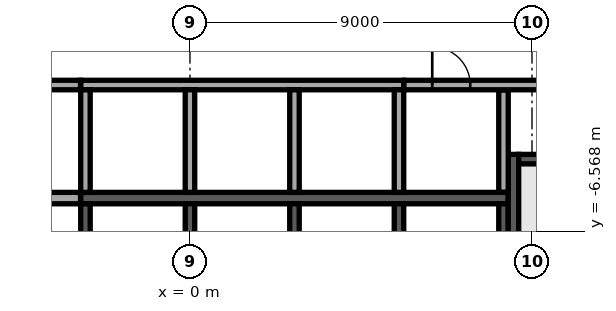
"""IFC4 building model, lengths in metres.
Left out: names, types, materials, properties, quantities, classifications, styles, units other than length and angle.
Written with IfcOpenShell. Run it as: python <this file> out.ifc"""

import sys

from ifc_helpers import new_model, si_unit, direction, frame, frame_2d, origin, place, context, subcontext, project, spatial, rectangle, extrude, element, fill, save


model = new_model("IFC4")
c1 = context("Model", 3, precision=1e-05, world=origin(), true_north=direction((0.0, 1.0)))
c2 = subcontext(c1, "Body", "Model", "MODEL_VIEW")
j1 = project(units=[si_unit("LENGTHUNIT", "METRE"), si_unit("PLANEANGLEUNIT", "RADIAN")], contexts=[c1])
p1 = place(None, origin())
s1 = spatial("IfcSite", under=j1, at=p1, CompositionType="ELEMENT")
p2 = place(p1, origin())
s2 = spatial("IfcBuilding", under=s1, at=p2, CompositionType="ELEMENT")
p3 = place(p2, frame((0.0, 0.0, 225.3)))
s3 = spatial("IfcBuildingStorey", under=s2, at=p3, CompositionType="ELEMENT", Elevation=225.3)
p4 = place(p3, frame((-2.875, -5.7, 0.0), z_axis=(0.0, 0.0, 1.0), x_axis=(1.0, 0.0, 0.0)))
e1 = element("IfcWall", 1, at=p4, inside=s3, PredefinedType="SOLIDWALL", context=c2, shape_type="SweptSolid", body=[
    extrude(rectangle(XDim=11.25, YDim=0.3, at=frame_2d((5.625, 0.0))), origin(), (0.0, 0.0, 1.0), 3.62),
])
p5 = place(p3, frame((-2.875, -2.725, 0.0), z_axis=(0.0, 0.0, 1.0), x_axis=(1.0, 0.0, 0.0)))
e2 = element("IfcWall", 2, at=p5, inside=s3, PredefinedType="SOLIDWALL", context=c2, shape_type="SweptSolid", body=[
    extrude(rectangle(XDim=8.5, YDim=0.25, at=frame_2d((4.25, 0.0))), origin(), (0.0, 0.0, 1.0), 3.62),
])
for number, where, z_axis, x_axis in (
    (3, (-2.75, -5.55, 0.0), (0.0, 0.0, 1.0), (0.0, 1.0, 0.0)),
    (4, (0.0, -5.55, 0.0), (0.0, 0.0, 1.0), (0.0, 1.0, 0.0)),
    (5, (2.75, -5.55, 0.0), (0.0, 0.0, 1.0), (0.0, 1.0, 0.0)),
    (6, (5.5, -5.55, 0.0), (0.0, 0.0, 1.0), (0.0, 1.0, 0.0)),
    (7, (-2.75, -8.55, 0.0), (0.0, 0.0, 1.0), (0.0, 1.0, 0.0)),
    (8, (0.0, -8.55, 0.0), (0.0, 0.0, 1.0), (0.0, 1.0, 0.0)),
    (9, (2.75, -8.55, 0.0), (0.0, 0.0, 1.0), (0.0, 1.0, 0.0)),
    (10, (5.5, -8.55, 0.0), (0.0, 0.0, 1.0), (0.0, 1.0, 0.0)),
    (11, (8.25, -8.55, 0.0), (0.0, 0.0, 1.0), (0.0, 1.0, 0.0)),
):
    element("IfcWall", number, at=place(p3, frame(where, z_axis=z_axis, x_axis=x_axis)), inside=s3, PredefinedType="SOLIDWALL", context=c2, shape_type="SweptSolid", body=[
        extrude(rectangle(XDim=2.7, YDim=0.25, at=frame_2d((1.35, 0.0))), origin(), (0.0, 0.0, 1.0), 3.62),
    ])
p6 = place(p3, frame((8.512, -4.55, 0.0), z_axis=(0.0, 0.0, 1.0), x_axis=(0.0, -1.0, 0.0)))
e12 = element("IfcWall", 12, at=p6, inside=s3, PredefinedType="SOLIDWALL", context=c2, shape_type="SweptSolid", body=[
    extrude(rectangle(XDim=7.25, YDim=0.275, at=frame_2d((3.625, 0.0))), origin(), (0.0, 0.0, 1.0), 3.62),
])
p7 = place(p6, frame((6.0, 0.0, 0.0)))
e13 = element("IfcOpeningElement", 13, at=p7, cuts=e12, PredefinedType="OPENING", context=c2, shape_type="SweptSolid", body=[
    extrude(rectangle(XDim=1.0, YDim=2.1, at=frame_2d((0.5, 1.05))), frame((0.0, 0.147, 0.0), z_axis=(0.0, -1.0, 0.0), x_axis=(1.0, 0.0, 0.0)), (0.0, 0.0, 1.0), 0.295),
])
p8 = place(p3, frame((8.65, -4.675, 0.0), z_axis=(0.0, 0.0, 1.0), x_axis=(1.0, 0.0, 0.0)))
e14 = element("IfcWall", 14, at=p8, inside=s3, PredefinedType="SOLIDWALL", context=c2, shape_type="SweptSolid", body=[
    extrude(rectangle(XDim=3.15, YDim=0.25, at=frame_2d((1.575, 0.0))), origin(), (0.0, 0.0, 1.0), 3.62),
])
p9 = place(p3, frame((-8.35, -5.7, 0.0), z_axis=(0.0, 0.0, 1.0), x_axis=(1.0, 0.0, 0.0)))
e15 = element("IfcWall", 15, at=p9, inside=s3, PredefinedType="PARTITIONING", context=c2, shape_type="SweptSolid", body=[
    extrude(rectangle(XDim=5.47, YDim=0.3, at=frame_2d((2.735, 0.0))), origin(), (0.0, 0.0, 1.0), 3.62),
])
p10 = place(p3, frame((8.25, -5.545, 0.0), z_axis=(0.0, 0.0, 1.0), x_axis=(0.0, 1.0, 0.0)))
e16 = element("IfcWall", 16, at=p10, inside=s3, PredefinedType="PARTITIONING", context=c2, shape_type="SweptSolid", body=[
    extrude(rectangle(XDim=2.69, YDim=0.25, at=frame_2d((1.345, 0.0))), origin(), (0.0, 0.0, 1.0), 3.62),
])
p11 = place(p3, frame((-11.795, -2.725, 0.0), z_axis=(0.0, 0.0, 1.0), x_axis=(1.0, 0.0, 0.0)))
e17 = element("IfcWall", 17, at=p11, inside=s3, PredefinedType="PARTITIONING", context=c2, shape_type="SweptSolid", body=[
    extrude(rectangle(XDim=8.915, YDim=0.25, at=frame_2d((4.458, 0.0))), origin(), (0.0, 0.0, 1.0), 3.62),
])
p12 = place(p11, frame((1.295, 0.0, 0.0)))
e18 = element("IfcOpeningElement", 18, at=p12, cuts=e17, PredefinedType="OPENING", context=c2, shape_type="SweptSolid", body=[
    extrude(rectangle(XDim=1.0, YDim=2.1, at=frame_2d((0.5, 1.05))), frame((0.0, 0.135, 0.0), z_axis=(0.0, -1.0, 0.0), x_axis=(1.0, 0.0, 0.0)), (0.0, 0.0, 1.0), 0.27),
])
p13 = place(p11, frame((4.42, 0.0, 0.0)))
e19 = element("IfcOpeningElement", 19, at=p13, cuts=e17, PredefinedType="OPENING", context=c2, shape_type="SweptSolid", body=[
    extrude(rectangle(XDim=1.0, YDim=2.1, at=frame_2d((0.5, 1.05))), frame((0.0, 0.135, 0.0), z_axis=(0.0, -1.0, 0.0), x_axis=(1.0, 0.0, 0.0)), (0.0, 0.0, 1.0), 0.27),
])
p14 = place(p3, frame((5.63, -2.725, 0.0), z_axis=(0.0, 0.0, 1.0), x_axis=(1.0, 0.0, 0.0)))
e20 = element("IfcWall", 20, at=p14, inside=s3, PredefinedType="PARTITIONING", context=c2, shape_type="SweptSolid", body=[
    extrude(rectangle(XDim=6.165, YDim=0.25, at=frame_2d((3.083, 0.0))), origin(), (0.0, 0.0, 1.0), 3.62),
])
p15 = place(p14, frame((0.745, 0.0, 0.0)))
e21 = element("IfcOpeningElement", 21, at=p15, cuts=e20, PredefinedType="OPENING", context=c2, shape_type="SweptSolid", body=[
    extrude(rectangle(XDim=1.0, YDim=2.1, at=frame_2d((0.5, 1.05))), frame((0.0, 0.135, 0.0), z_axis=(0.0, -1.0, 0.0), x_axis=(1.0, 0.0, 0.0)), (0.0, 0.0, 1.0), 0.27),
])
p16 = place(p14, frame((3.92, 0.0, 0.0)))
e22 = element("IfcOpeningElement", 22, at=p16, cuts=e20, PredefinedType="OPENING", context=c2, shape_type="SweptSolid", body=[
    extrude(rectangle(XDim=0.9, YDim=2.1, at=frame_2d((0.45, 1.05))), frame((0.0, 0.135, 0.0), z_axis=(0.0, -1.0, 0.0), x_axis=(1.0, 0.0, 0.0)), (0.0, 0.0, 1.0), 0.27),
])
p17 = place(p3, frame((-3.777, 34.584, 0.0), z_axis=(0.0, 0.0, 1.0), x_axis=(-0.629323778295, -0.777143218508, 0.0)))
e23 = element("IfcWall", 23, at=p17, inside=s3, PredefinedType="STANDARD", context=c2, shape_type="SweptSolid", body=[
    extrude(rectangle(XDim=49.0, YDim=0.6, at=frame_2d((24.5, 0.0))), origin(), (0.0, 0.0, 1.0), 3.62),
])
p18 = place(p17, frame((1.227, 0.0, 0.9)))
e24 = element("IfcOpeningElement", 24, at=p18, cuts=e23, PredefinedType="OPENING", context=c2, shape_type="SweptSolid", body=[
    extrude(rectangle(XDim=2.0, YDim=2.1, at=frame_2d((1.0, 1.05))), frame((0.0, 0.31, 0.0), z_axis=(0.0, -1.0, 0.0), x_axis=(1.0, 0.0, 0.0)), (0.0, 0.0, 1.0), 0.62),
])
p19 = place(p17, frame((5.682, 0.0, 0.9)))
e25 = element("IfcOpeningElement", 25, at=p19, cuts=e23, PredefinedType="OPENING", context=c2, shape_type="SweptSolid", body=[
    extrude(rectangle(XDim=2.0, YDim=2.1, at=frame_2d((1.0, 1.05))), frame((0.0, 0.31, 0.0), z_axis=(0.0, -1.0, 0.0), x_axis=(1.0, 0.0, 0.0)), (0.0, 0.0, 1.0), 0.62),
])
p20 = place(p17, frame((10.136, 0.0, 0.9)))
e26 = element("IfcOpeningElement", 26, at=p20, cuts=e23, PredefinedType="OPENING", context=c2, shape_type="SweptSolid", body=[
    extrude(rectangle(XDim=2.0, YDim=2.1, at=frame_2d((1.0, 1.05))), frame((0.0, 0.31, 0.0), z_axis=(0.0, -1.0, 0.0), x_axis=(1.0, 0.0, 0.0)), (0.0, 0.0, 1.0), 0.62),
])
p21 = place(p17, frame((14.591, 0.0, 0.9)))
e27 = element("IfcOpeningElement", 27, at=p21, cuts=e23, PredefinedType="OPENING", context=c2, shape_type="SweptSolid", body=[
    extrude(rectangle(XDim=2.0, YDim=2.1, at=frame_2d((1.0, 1.05))), frame((0.0, 0.31, 0.0), z_axis=(0.0, -1.0, 0.0), x_axis=(1.0, 0.0, 0.0)), (0.0, 0.0, 1.0), 0.62),
])
p22 = place(p17, frame((19.045, 0.0, 0.9)))
e28 = element("IfcOpeningElement", 28, at=p22, cuts=e23, PredefinedType="OPENING", context=c2, shape_type="SweptSolid", body=[
    extrude(rectangle(XDim=2.0, YDim=2.1, at=frame_2d((1.0, 1.05))), frame((0.0, 0.31, 0.0), z_axis=(0.0, -1.0, 0.0), x_axis=(1.0, 0.0, 0.0)), (0.0, 0.0, 1.0), 0.62),
])
p23 = place(p17, frame((23.5, 0.0, 0.9)))
e29 = element("IfcOpeningElement", 29, at=p23, cuts=e23, PredefinedType="OPENING", context=c2, shape_type="SweptSolid", body=[
    extrude(rectangle(XDim=2.0, YDim=2.1, at=frame_2d((1.0, 1.05))), frame((0.0, 0.31, 0.0), z_axis=(0.0, -1.0, 0.0), x_axis=(1.0, 0.0, 0.0)), (0.0, 0.0, 1.0), 0.62),
])
p24 = place(p17, frame((27.955, 0.0, 0.9)))
e30 = element("IfcOpeningElement", 30, at=p24, cuts=e23, PredefinedType="OPENING", context=c2, shape_type="SweptSolid", body=[
    extrude(rectangle(XDim=2.0, YDim=2.1, at=frame_2d((1.0, 1.05))), frame((0.0, 0.31, 0.0), z_axis=(0.0, -1.0, 0.0), x_axis=(1.0, 0.0, 0.0)), (0.0, 0.0, 1.0), 0.62),
])
p25 = place(p17, frame((32.409, 0.0, 0.9)))
e31 = element("IfcOpeningElement", 31, at=p25, cuts=e23, PredefinedType="OPENING", context=c2, shape_type="SweptSolid", body=[
    extrude(rectangle(XDim=2.0, YDim=2.1, at=frame_2d((1.0, 1.05))), frame((0.0, 0.31, 0.0), z_axis=(0.0, -1.0, 0.0), x_axis=(1.0, 0.0, 0.0)), (0.0, 0.0, 1.0), 0.62),
])
p26 = place(p17, frame((36.864, 0.0, 0.9)))
e32 = element("IfcOpeningElement", 32, at=p26, cuts=e23, PredefinedType="OPENING", context=c2, shape_type="SweptSolid", body=[
    extrude(rectangle(XDim=2.0, YDim=2.1, at=frame_2d((1.0, 1.05))), frame((0.0, 0.31, 0.0), z_axis=(0.0, -1.0, 0.0), x_axis=(1.0, 0.0, 0.0)), (0.0, 0.0, 1.0), 0.62),
])
p27 = place(p17, frame((41.318, 0.0, 0.9)))
e33 = element("IfcOpeningElement", 33, at=p27, cuts=e23, PredefinedType="OPENING", context=c2, shape_type="SweptSolid", body=[
    extrude(rectangle(XDim=2.0, YDim=2.1, at=frame_2d((1.0, 1.05))), frame((0.0, 0.31, 0.0), z_axis=(0.0, -1.0, 0.0), x_axis=(1.0, 0.0, 0.0)), (0.0, 0.0, 1.0), 0.62),
])
p28 = place(p17, frame((45.773, 0.0, 0.9)))
e34 = element("IfcOpeningElement", 34, at=p28, cuts=e23, PredefinedType="OPENING", context=c2, shape_type="SweptSolid", body=[
    extrude(rectangle(XDim=2.0, YDim=2.1, at=frame_2d((1.0, 1.05))), frame((0.0, 0.31, 0.0), z_axis=(0.0, -1.0, 0.0), x_axis=(1.0, 0.0, 0.0)), (0.0, 0.0, 1.0), 0.62),
])
p29 = place(p3, frame((3.777, -34.584, 0.0), z_axis=(0.0, 0.0, 1.0), x_axis=(0.629323778295, 0.777143218508, 0.0)))
e35 = element("IfcWall", 35, at=p29, inside=s3, PredefinedType="STANDARD", context=c2, shape_type="SweptSolid", body=[
    extrude(rectangle(XDim=49.0, YDim=0.6, at=frame_2d((24.5, 0.0))), origin(), (0.0, 0.0, 1.0), 3.62),
])
p30 = place(p29, frame((1.227, 0.0, 0.9)))
e36 = element("IfcOpeningElement", 36, at=p30, cuts=e35, PredefinedType="OPENING", context=c2, shape_type="SweptSolid", body=[
    extrude(rectangle(XDim=2.0, YDim=2.1, at=frame_2d((1.0, 1.05))), frame((0.0, 0.31, 0.0), z_axis=(0.0, -1.0, 0.0), x_axis=(1.0, 0.0, 0.0)), (0.0, 0.0, 1.0), 0.62),
])
p31 = place(p29, frame((5.682, 0.0, 0.9)))
e37 = element("IfcOpeningElement", 37, at=p31, cuts=e35, PredefinedType="OPENING", context=c2, shape_type="SweptSolid", body=[
    extrude(rectangle(XDim=2.0, YDim=2.1, at=frame_2d((1.0, 1.05))), frame((0.0, 0.31, 0.0), z_axis=(0.0, -1.0, 0.0), x_axis=(1.0, 0.0, 0.0)), (0.0, 0.0, 1.0), 0.62),
])
p32 = place(p29, frame((10.136, 0.0, 0.9)))
e38 = element("IfcOpeningElement", 38, at=p32, cuts=e35, PredefinedType="OPENING", context=c2, shape_type="SweptSolid", body=[
    extrude(rectangle(XDim=2.0, YDim=2.1, at=frame_2d((1.0, 1.05))), frame((0.0, 0.31, 0.0), z_axis=(0.0, -1.0, 0.0), x_axis=(1.0, 0.0, 0.0)), (0.0, 0.0, 1.0), 0.62),
])
p33 = place(p29, frame((14.591, 0.0, 0.9)))
e39 = element("IfcOpeningElement", 39, at=p33, cuts=e35, PredefinedType="OPENING", context=c2, shape_type="SweptSolid", body=[
    extrude(rectangle(XDim=2.0, YDim=2.1, at=frame_2d((1.0, 1.05))), frame((0.0, 0.31, 0.0), z_axis=(0.0, -1.0, 0.0), x_axis=(1.0, 0.0, 0.0)), (0.0, 0.0, 1.0), 0.62),
])
p34 = place(p29, frame((19.045, 0.0, 0.9)))
e40 = element("IfcOpeningElement", 40, at=p34, cuts=e35, PredefinedType="OPENING", context=c2, shape_type="SweptSolid", body=[
    extrude(rectangle(XDim=2.0, YDim=2.1, at=frame_2d((1.0, 1.05))), frame((0.0, 0.31, 0.0), z_axis=(0.0, -1.0, 0.0), x_axis=(1.0, 0.0, 0.0)), (0.0, 0.0, 1.0), 0.62),
])
p35 = place(p29, frame((23.5, 0.0, 0.9)))
e41 = element("IfcOpeningElement", 41, at=p35, cuts=e35, PredefinedType="OPENING", context=c2, shape_type="SweptSolid", body=[
    extrude(rectangle(XDim=2.0, YDim=2.1, at=frame_2d((1.0, 1.05))), frame((0.0, 0.31, 0.0), z_axis=(0.0, -1.0, 0.0), x_axis=(1.0, 0.0, 0.0)), (0.0, 0.0, 1.0), 0.62),
])
p36 = place(p29, frame((27.955, 0.0, 0.9)))
e42 = element("IfcOpeningElement", 42, at=p36, cuts=e35, PredefinedType="OPENING", context=c2, shape_type="SweptSolid", body=[
    extrude(rectangle(XDim=2.0, YDim=2.1, at=frame_2d((1.0, 1.05))), frame((0.0, 0.31, 0.0), z_axis=(0.0, -1.0, 0.0), x_axis=(1.0, 0.0, 0.0)), (0.0, 0.0, 1.0), 0.62),
])
p37 = place(p29, frame((32.409, 0.0, 0.9)))
e43 = element("IfcOpeningElement", 43, at=p37, cuts=e35, PredefinedType="OPENING", context=c2, shape_type="SweptSolid", body=[
    extrude(rectangle(XDim=2.0, YDim=2.1, at=frame_2d((1.0, 1.05))), frame((0.0, 0.31, 0.0), z_axis=(0.0, -1.0, 0.0), x_axis=(1.0, 0.0, 0.0)), (0.0, 0.0, 1.0), 0.62),
])
p38 = place(p29, frame((36.864, 0.0, 0.9)))
e44 = element("IfcOpeningElement", 44, at=p38, cuts=e35, PredefinedType="OPENING", context=c2, shape_type="SweptSolid", body=[
    extrude(rectangle(XDim=2.0, YDim=2.1, at=frame_2d((1.0, 1.05))), frame((0.0, 0.31, 0.0), z_axis=(0.0, -1.0, 0.0), x_axis=(1.0, 0.0, 0.0)), (0.0, 0.0, 1.0), 0.62),
])
p39 = place(p29, frame((41.318, 0.0, 0.9)))
e45 = element("IfcOpeningElement", 45, at=p39, cuts=e35, PredefinedType="OPENING", context=c2, shape_type="SweptSolid", body=[
    extrude(rectangle(XDim=2.0, YDim=2.1, at=frame_2d((1.0, 1.05))), frame((0.0, 0.31, 0.0), z_axis=(0.0, -1.0, 0.0), x_axis=(1.0, 0.0, 0.0)), (0.0, 0.0, 1.0), 0.62),
])
p40 = place(p29, frame((45.773, 0.0, 0.9)))
e46 = element("IfcOpeningElement", 46, at=p40, cuts=e35, PredefinedType="OPENING", context=c2, shape_type="SweptSolid", body=[
    extrude(rectangle(XDim=2.0, YDim=2.1, at=frame_2d((1.0, 1.05))), frame((0.0, 0.31, 0.0), z_axis=(0.0, -1.0, 0.0), x_axis=(1.0, 0.0, 0.0)), (0.0, 0.0, 1.0), 0.62),
])
p41 = place(p3, frame((-26.769, -2.487, 0.0), z_axis=(0.0, 0.0, 1.0), x_axis=(0.629320703929, 0.777145708092, 0.0)))
e47 = element("IfcWall", 47, at=p41, inside=s3, PredefinedType="PARTITIONING", context=c2, shape_type="SweptSolid", body=[
    extrude(rectangle(XDim=37.558, YDim=0.15, at=frame_2d((18.779, 0.0))), origin(), (0.0, 0.0, 1.0), 2.97),
])
p42 = place(p41, frame((3.55, 0.0, 0.0)))
e48 = element("IfcOpeningElement", 48, at=p42, cuts=e47, PredefinedType="OPENING", context=c2, shape_type="SweptSolid", body=[
    extrude(rectangle(XDim=1.0, YDim=2.1, at=frame_2d((0.5, 1.05))), frame((0.0, 0.085, 0.0), z_axis=(0.0, -1.0, 0.0), x_axis=(1.0, 0.0, 0.0)), (0.0, 0.0, 1.0), 0.17),
])
p43 = place(p41, frame((11.862, 0.0, 0.0)))
e49 = element("IfcOpeningElement", 49, at=p43, cuts=e47, PredefinedType="OPENING", context=c2, shape_type="SweptSolid", body=[
    extrude(rectangle(XDim=1.0, YDim=2.1, at=frame_2d((0.5, 1.05))), frame((0.0, 0.085, 0.0), z_axis=(0.0, -1.0, 0.0), x_axis=(1.0, 0.0, 0.0)), (0.0, 0.0, 1.0), 0.17),
])
p44 = place(p41, frame((21.452, 0.0, 0.0)))
e50 = element("IfcOpeningElement", 50, at=p44, cuts=e47, PredefinedType="OPENING", context=c2, shape_type="SweptSolid", body=[
    extrude(rectangle(XDim=1.0, YDim=2.1, at=frame_2d((0.5, 1.05))), frame((0.0, 0.085, 0.0), z_axis=(0.0, -1.0, 0.0), x_axis=(1.0, 0.0, 0.0)), (0.0, 0.0, 1.0), 0.17),
])
p45 = place(p41, frame((31.223, 0.0, 0.0)))
e51 = element("IfcOpeningElement", 51, at=p45, cuts=e47, PredefinedType="OPENING", context=c2, shape_type="SweptSolid", body=[
    extrude(rectangle(XDim=1.0, YDim=2.1, at=frame_2d((0.5, 1.05))), frame((0.0, 0.085, 0.0), z_axis=(0.0, -1.0, 0.0), x_axis=(1.0, 0.0, 0.0)), (0.0, 0.0, 1.0), 0.17),
])
p46 = place(p41, frame((35.359, 0.0, 0.0)))
e52 = element("IfcOpeningElement", 52, at=p46, cuts=e47, PredefinedType="OPENING", context=c2, shape_type="SweptSolid", body=[
    extrude(rectangle(XDim=1.0, YDim=2.1, at=frame_2d((0.5, 1.05))), frame((0.0, 0.085, 0.0), z_axis=(0.0, -1.0, 0.0), x_axis=(1.0, 0.0, 0.0)), (0.0, 0.0, 1.0), 0.17),
])
p47 = place(p3, frame((3.18, -26.643, 0.0), z_axis=(0.0, 0.0, 1.0), x_axis=(0.629322822444, 0.777143992547, 0.0)))
e53 = element("IfcWall", 53, at=p47, inside=s3, PredefinedType="PARTITIONING", context=c2, shape_type="SweptSolid", body=[
    extrude(rectangle(XDim=37.483, YDim=0.15, at=frame_2d((18.741, 0.0))), origin(), (0.0, 0.0, 1.0), 3.17),
])
p48 = place(p47, frame((6.346, 0.0, 0.0)))
e54 = element("IfcOpeningElement", 54, at=p48, cuts=e53, PredefinedType="OPENING", context=c2, shape_type="SweptSolid", body=[
    extrude(rectangle(XDim=1.0, YDim=2.1, at=frame_2d((0.5, 1.05))), frame((0.0, 0.085, 0.0), z_axis=(0.0, -1.0, 0.0), x_axis=(1.0, 0.0, 0.0)), (0.0, 0.0, 1.0), 0.17),
])
p49 = place(p47, frame((16.452, 0.0, 0.0)))
e55 = element("IfcOpeningElement", 55, at=p49, cuts=e53, PredefinedType="OPENING", context=c2, shape_type="SweptSolid", body=[
    extrude(rectangle(XDim=1.0, YDim=2.1, at=frame_2d((0.5, 1.05))), frame((0.0, 0.085, 0.0), z_axis=(0.0, -1.0, 0.0), x_axis=(1.0, 0.0, 0.0)), (0.0, 0.0, 1.0), 0.17),
])
p50 = place(p47, frame((23.4, 0.0, 0.0)))
e56 = element("IfcOpeningElement", 56, at=p50, cuts=e53, PredefinedType="OPENING", context=c2, shape_type="SweptSolid", body=[
    extrude(rectangle(XDim=1.0, YDim=2.1, at=frame_2d((0.5, 1.05))), frame((0.0, 0.085, 0.0), z_axis=(0.0, -1.0, 0.0), x_axis=(1.0, 0.0, 0.0)), (0.0, 0.0, 1.0), 0.17),
])
p51 = place(p15, origin())
e57 = element("IfcDoor", 57, at=p51, inside=s3, OperationType="SINGLE_SWING_RIGHT", PredefinedType="DOOR", context=c2, shape_type="SweptSolid", body=[
    extrude(rectangle(XDim=1.0, YDim=2.1, at=frame_2d((0.5, 1.05))), frame((0.0, 0.025, 0.0), z_axis=(0.0, -1.0, 0.0), x_axis=(1.0, 0.0, 0.0)), (0.0, 0.0, 1.0), 0.05),
])
fill(e21, e57)
save(model, sys.argv[1])
